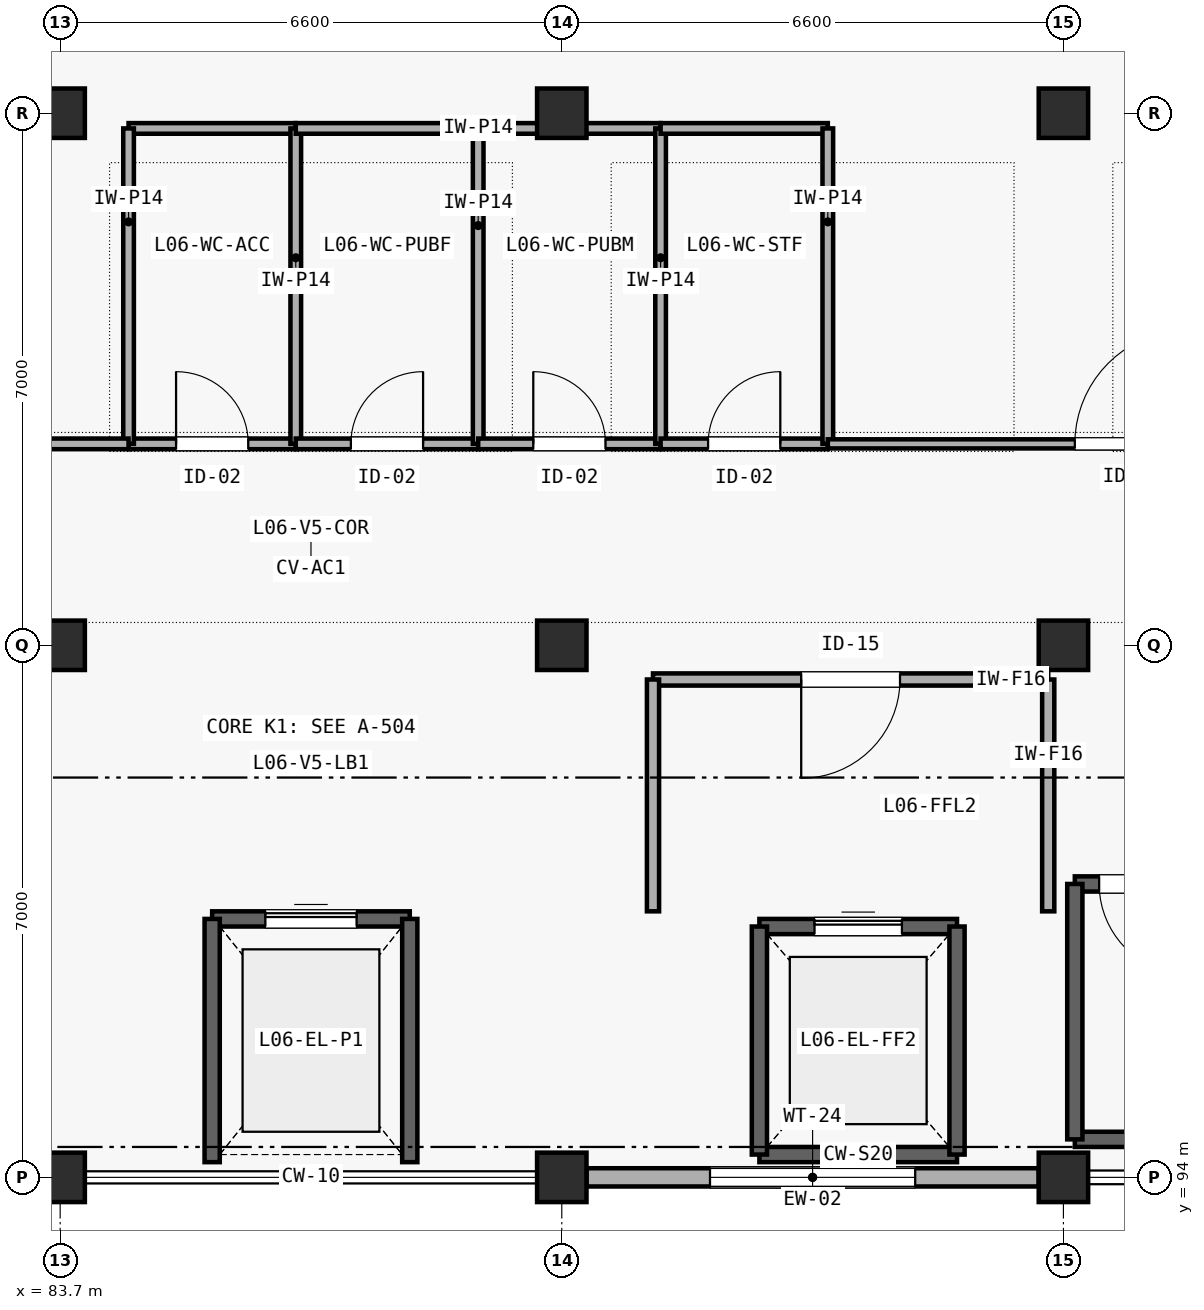
"""IFC4 building model, lengths in metres.
Left out: names, types, materials, properties, quantities, classifications, styles, units other than length and angle.
Written with IfcOpenShell. Run it as: python <this file> out.ifc"""

import sys

from ifc_helpers import new_model, si_unit, direction, frame, frame_2d, origin, origin_2d, place, context, subcontext, project, spatial, rectangle, extrude, element, fill, save


model = new_model("IFC4")
c1 = context("Model", 3, precision=1e-05, world=origin(), true_north=direction((0.0, 1.0)))
c2 = subcontext(c1, "Body", "Model", "MODEL_VIEW")
j1 = project(units=[si_unit("LENGTHUNIT", "METRE"), si_unit("PLANEANGLEUNIT", "RADIAN")], contexts=[c1])
p1 = place(None, origin())
s1 = spatial("IfcSite", under=j1, at=p1, CompositionType="ELEMENT")
p2 = place(p1, origin())
s2 = spatial("IfcBuilding", under=s1, at=p2, CompositionType="ELEMENT")
p3 = place(p2, frame((0.0, 0.0, 25.2)))
s3 = spatial("IfcBuildingStorey", under=s2, at=p3, CompositionType="ELEMENT", Elevation=25.2)
for number, where, z_axis, x_axis in (
    (1, (83.7, 94.0, 0.0), (0.0, 0.0, 1.0), (1.0, 0.0, 0.0)),
    (2, (83.7, 101.0, 0.0), (0.0, 0.0, 1.0), (1.0, 0.0, 0.0)),
    (3, (83.7, 108.0, 0.0), (0.0, 0.0, 1.0), (1.0, 0.0, 0.0)),
    (4, (90.3, 94.0, 0.0), (0.0, 0.0, 1.0), (1.0, 0.0, 0.0)),
    (5, (90.3, 101.0, 0.0), (0.0, 0.0, 1.0), (1.0, 0.0, 0.0)),
    (6, (90.3, 108.0, 0.0), (0.0, 0.0, 1.0), (1.0, 0.0, 0.0)),
    (7, (96.9, 94.0, 0.0), (0.0, 0.0, 1.0), (1.0, 0.0, 0.0)),
    (8, (96.9, 101.0, 0.0), (0.0, 0.0, 1.0), (1.0, 0.0, 0.0)),
    (9, (96.9, 108.0, 0.0), (0.0, 0.0, 1.0), (1.0, 0.0, 0.0)),
):
    element("IfcColumn", number, at=place(p3, frame(where, z_axis=z_axis, x_axis=x_axis)), inside=s3, PredefinedType="COLUMN", context=c2, shape_type="SweptSolid", body=[
        extrude(rectangle(XDim=0.65, YDim=0.65, at=origin_2d()), origin(), (0.0, 0.0, 1.0), 4.2),
    ])
p4 = place(p3, frame((90.625, 94.0, 0.0), z_axis=(0.0, 0.0, 1.0), x_axis=(1.0, 0.0, 0.0)))
e10 = element("IfcWall", 10, at=p4, inside=s3, PredefinedType="SOLIDWALL", context=c2, shape_type="SweptSolid", body=[
    extrude(rectangle(XDim=5.95, YDim=0.24, at=frame_2d((2.975, 0.0))), origin(), (0.0, 0.0, 1.0), 3.235),
])
p5 = place(p4, frame((1.625, 0.0, 0.85)))
e11 = element("IfcOpeningElement", 11, at=p5, cuts=e10, PredefinedType="OPENING", context=c2, shape_type="SweptSolid", body=[
    extrude(rectangle(XDim=2.7, YDim=1.6, at=frame_2d((1.35, 0.8))), frame((0.0, 0.13, 0.0), z_axis=(0.0, -1.0, 0.0), x_axis=(1.0, 0.0, 0.0)), (0.0, 0.0, 1.0), 0.26),
])
p6 = place(p3, frame((97.05, 94.5, 0.0), z_axis=(0.0, 0.0, 1.0), x_axis=(1.0, 0.0, 0.0)))
e12 = element("IfcWall", 12, at=p6, inside=s3, PredefinedType="SHEAR", context=c2, shape_type="SweptSolid", body=[
    extrude(rectangle(XDim=6.3, YDim=0.2, at=frame_2d((3.15, 0.0))), origin(), (0.0, 0.0, 1.0), 4.2),
])
p7 = place(p3, frame((97.05, 97.86, 0.0), z_axis=(0.0, 0.0, 1.0), x_axis=(1.0, 0.0, 0.0)))
e13 = element("IfcWall", 13, at=p7, inside=s3, PredefinedType="SHEAR", context=c2, shape_type="SweptSolid", body=[
    extrude(rectangle(XDim=6.3, YDim=0.2, at=frame_2d((3.15, 0.0))), origin(), (0.0, 0.0, 1.0), 4.2),
])
p8 = place(p7, frame((0.32, 0.0, 0.0)))
e14 = element("IfcOpeningElement", 14, at=p8, cuts=e13, PredefinedType="OPENING", context=c2, shape_type="SweptSolid", body=[
    extrude(rectangle(XDim=1.2, YDim=2.15, at=frame_2d((0.6, 1.075))), frame((0.0, 0.11, 0.0), z_axis=(0.0, -1.0, 0.0), x_axis=(1.0, 0.0, 0.0)), (0.0, 0.0, 1.0), 0.22),
])
p9 = place(p3, frame((97.05, 94.5, 0.0), z_axis=(0.0, 0.0, 1.0), x_axis=(0.0, 1.0, 0.0)))
e15 = element("IfcWall", 15, at=p9, inside=s3, PredefinedType="SHEAR", context=c2, shape_type="SweptSolid", body=[
    extrude(rectangle(XDim=3.36, YDim=0.2, at=frame_2d((1.68, 0.0))), origin(), (0.0, 0.0, 1.0), 4.2),
])
p10 = place(p3, frame((92.9, 94.3, 0.0), z_axis=(0.0, 0.0, 1.0), x_axis=(1.0, 0.0, 0.0)))
e16 = element("IfcWall", 16, at=p10, inside=s3, PredefinedType="SHEAR", context=c2, shape_type="SweptSolid", body=[
    extrude(rectangle(XDim=2.6, YDim=0.2, at=frame_2d((1.3, 0.0))), origin(), (0.0, 0.0, 1.0), 4.2),
])
p11 = place(p3, frame((92.9, 97.3, 0.0), z_axis=(0.0, 0.0, 1.0), x_axis=(1.0, 0.0, 0.0)))
e17 = element("IfcWall", 17, at=p11, inside=s3, PredefinedType="SHEAR", context=c2, shape_type="SweptSolid", body=[
    extrude(rectangle(XDim=2.6, YDim=0.2, at=frame_2d((1.3, 0.0))), origin(), (0.0, 0.0, 1.0), 4.2),
])
p12 = place(p11, frame((0.725, 0.0, 0.0)))
e18 = element("IfcOpeningElement", 18, at=p12, cuts=e17, PredefinedType="OPENING", context=c2, shape_type="SweptSolid", body=[
    extrude(rectangle(XDim=1.15, YDim=2.2, at=frame_2d((0.575, 1.1))), frame((0.0, 0.11, 0.0), z_axis=(0.0, -1.0, 0.0), x_axis=(1.0, 0.0, 0.0)), (0.0, 0.0, 1.0), 0.22),
])
for number, where, z_axis, x_axis in (
    (19, (92.9, 94.3, 0.0), (0.0, 0.0, 1.0), (0.0, 1.0, 0.0)),
    (20, (95.5, 94.3, 0.0), (0.0, 0.0, 1.0), (0.0, 1.0, 0.0)),
):
    element("IfcWall", number, at=place(p3, frame(where, z_axis=z_axis, x_axis=x_axis)), inside=s3, PredefinedType="SHEAR", context=c2, shape_type="SweptSolid", body=[
        extrude(rectangle(XDim=3.0, YDim=0.2, at=frame_2d((1.5, 0.0))), origin(), (0.0, 0.0, 1.0), 4.2),
    ])
p13 = place(p3, frame((85.7, 97.4, 0.0), z_axis=(0.0, 0.0, 1.0), x_axis=(1.0, 0.0, 0.0)))
e21 = element("IfcWall", 21, at=p13, inside=s3, PredefinedType="SHEAR", context=c2, shape_type="SweptSolid", body=[
    extrude(rectangle(XDim=2.6, YDim=0.2, at=frame_2d((1.3, 0.0))), origin(), (0.0, 0.0, 1.0), 4.2),
])
p14 = place(p13, frame((0.7, 0.0, 0.0)))
e22 = element("IfcOpeningElement", 22, at=p14, cuts=e21, PredefinedType="OPENING", context=c2, shape_type="SweptSolid", body=[
    extrude(rectangle(XDim=1.2, YDim=2.2, at=frame_2d((0.6, 1.1))), frame((0.0, 0.11, 0.0), z_axis=(0.0, -1.0, 0.0), x_axis=(1.0, 0.0, 0.0)), (0.0, 0.0, 1.0), 0.22),
])
for number, where, z_axis, x_axis in (
    (23, (85.7, 94.2, 0.0), (0.0, 0.0, 1.0), (0.0, 1.0, 0.0)),
    (24, (88.3, 94.2, 0.0), (0.0, 0.0, 1.0), (0.0, 1.0, 0.0)),
):
    element("IfcWall", number, at=place(p3, frame(where, z_axis=z_axis, x_axis=x_axis)), inside=s3, PredefinedType="SHEAR", context=c2, shape_type="SweptSolid", body=[
        extrude(rectangle(XDim=3.2, YDim=0.2, at=frame_2d((1.6, 0.0))), origin(), (0.0, 0.0, 1.0), 4.2),
    ])
p15 = place(p3, frame((91.5, 100.55, 0.0), z_axis=(0.0, 0.0, 1.0), x_axis=(1.0, 0.0, 0.0)))
e25 = element("IfcWall", 25, at=p15, inside=s3, PredefinedType="SOLIDWALL", context=c2, shape_type="SweptSolid", body=[
    extrude(rectangle(XDim=5.2, YDim=0.16, at=frame_2d((2.6, 0.0))), origin(), (0.0, 0.0, 1.0), 3.9),
])
p16 = place(p15, frame((1.95, 0.0, 0.0)))
e26 = element("IfcOpeningElement", 26, at=p16, cuts=e25, PredefinedType="OPENING", context=c2, shape_type="SweptSolid", body=[
    extrude(rectangle(XDim=1.3, YDim=2.15, at=frame_2d((0.65, 1.075))), frame((0.0, 0.09, 0.0), z_axis=(0.0, -1.0, 0.0), x_axis=(1.0, 0.0, 0.0)), (0.0, 0.0, 1.0), 0.18),
])
p17 = place(p3, frame((91.5, 97.5, 0.0), z_axis=(0.0, 0.0, 1.0), x_axis=(0.0, 1.0, 0.0)))
e27 = element("IfcWall", 27, at=p17, inside=s3, PredefinedType="SOLIDWALL", context=c2, shape_type="SweptSolid", body=[
    extrude(rectangle(XDim=3.05, YDim=0.16, at=frame_2d((1.525, 0.0))), origin(), (0.0, 0.0, 1.0), 3.9),
])
p18 = place(p3, frame((96.7, 97.5, 0.0), z_axis=(0.0, 0.0, 1.0), x_axis=(0.0, 1.0, 0.0)))
e28 = element("IfcWall", 28, at=p18, inside=s3, PredefinedType="SOLIDWALL", context=c2, shape_type="SweptSolid", body=[
    extrude(rectangle(XDim=3.05, YDim=0.16, at=frame_2d((1.525, 0.0))), origin(), (0.0, 0.0, 1.0), 3.405),
])
p19 = place(p3, frame((84.6, 103.65, 0.0), z_axis=(0.0, 0.0, 1.0), x_axis=(1.0, 0.0, 0.0)))
e29 = element("IfcWall", 29, at=p19, inside=s3, PredefinedType="PLUMBINGWALL", context=c2, shape_type="SweptSolid", body=[
    extrude(rectangle(XDim=2.2, YDim=0.14, at=frame_2d((1.1, 0.0))), origin(), (0.0, 0.0, 1.0), 3.9),
])
p20 = place(p19, frame((0.625, 0.0, 0.0)))
e30 = element("IfcOpeningElement", 30, at=p20, cuts=e29, PredefinedType="OPENING", context=c2, shape_type="SweptSolid", body=[
    extrude(rectangle(XDim=0.95, YDim=2.1, at=frame_2d((0.475, 1.05))), frame((0.0, 0.08, 0.0), z_axis=(0.0, -1.0, 0.0), x_axis=(1.0, 0.0, 0.0)), (0.0, 0.0, 1.0), 0.16),
])
p21 = place(p3, frame((84.6, 107.8, 0.0), z_axis=(0.0, 0.0, 1.0), x_axis=(1.0, 0.0, 0.0)))
e31 = element("IfcWall", 31, at=p21, inside=s3, PredefinedType="PLUMBINGWALL", context=c2, shape_type="SweptSolid", body=[
    extrude(rectangle(XDim=2.2, YDim=0.14, at=frame_2d((1.1, 0.0))), origin(), (0.0, 0.0, 1.0), 3.235),
])
for number, where, z_axis, x_axis in (
    (32, (84.6, 103.65, 0.0), (0.0, 0.0, 1.0), (0.0, 1.0, 0.0)),
    (33, (86.8, 103.65, 0.0), (0.0, 0.0, 1.0), (0.0, 1.0, 0.0)),
):
    element("IfcWall", number, at=place(p3, frame(where, z_axis=z_axis, x_axis=x_axis)), inside=s3, PredefinedType="PLUMBINGWALL", context=c2, shape_type="SweptSolid", body=[
        extrude(rectangle(XDim=4.15, YDim=0.14, at=frame_2d((2.075, 0.0))), origin(), (0.0, 0.0, 1.0), 3.9),
    ])
p22 = place(p3, frame((86.8, 103.65, 0.0), z_axis=(0.0, 0.0, 1.0), x_axis=(1.0, 0.0, 0.0)))
e34 = element("IfcWall", 34, at=p22, inside=s3, PredefinedType="PLUMBINGWALL", context=c2, shape_type="SweptSolid", body=[
    extrude(rectangle(XDim=2.4, YDim=0.14, at=frame_2d((1.2, 0.0))), origin(), (0.0, 0.0, 1.0), 3.9),
])
p23 = place(p22, frame((0.725, 0.0, 0.0)))
e35 = element("IfcOpeningElement", 35, at=p23, cuts=e34, PredefinedType="OPENING", context=c2, shape_type="SweptSolid", body=[
    extrude(rectangle(XDim=0.95, YDim=2.1, at=frame_2d((0.475, 1.05))), frame((0.0, 0.08, 0.0), z_axis=(0.0, -1.0, 0.0), x_axis=(1.0, 0.0, 0.0)), (0.0, 0.0, 1.0), 0.16),
])
p24 = place(p3, frame((86.8, 107.8, 0.0), z_axis=(0.0, 0.0, 1.0), x_axis=(1.0, 0.0, 0.0)))
e36 = element("IfcWall", 36, at=p24, inside=s3, PredefinedType="PLUMBINGWALL", context=c2, shape_type="SweptSolid", body=[
    extrude(rectangle(XDim=2.4, YDim=0.14, at=frame_2d((1.2, 0.0))), origin(), (0.0, 0.0, 1.0), 3.235),
])
p25 = place(p3, frame((89.2, 103.65, 0.0), z_axis=(0.0, 0.0, 1.0), x_axis=(0.0, 1.0, 0.0)))
e37 = element("IfcWall", 37, at=p25, inside=s3, PredefinedType="PLUMBINGWALL", context=c2, shape_type="SweptSolid", body=[
    extrude(rectangle(XDim=4.15, YDim=0.14, at=frame_2d((2.075, 0.0))), origin(), (0.0, 0.0, 1.0), 3.9),
])
p26 = place(p3, frame((89.2, 103.65, 0.0), z_axis=(0.0, 0.0, 1.0), x_axis=(1.0, 0.0, 0.0)))
e38 = element("IfcWall", 38, at=p26, inside=s3, PredefinedType="PLUMBINGWALL", context=c2, shape_type="SweptSolid", body=[
    extrude(rectangle(XDim=2.4, YDim=0.14, at=frame_2d((1.2, 0.0))), origin(), (0.0, 0.0, 1.0), 3.9),
])
p27 = place(p26, frame((0.725, 0.0, 0.0)))
e39 = element("IfcOpeningElement", 39, at=p27, cuts=e38, PredefinedType="OPENING", context=c2, shape_type="SweptSolid", body=[
    extrude(rectangle(XDim=0.95, YDim=2.1, at=frame_2d((0.475, 1.05))), frame((0.0, 0.08, 0.0), z_axis=(0.0, -1.0, 0.0), x_axis=(1.0, 0.0, 0.0)), (0.0, 0.0, 1.0), 0.16),
])
p28 = place(p3, frame((89.2, 107.8, 0.0), z_axis=(0.0, 0.0, 1.0), x_axis=(1.0, 0.0, 0.0)))
e40 = element("IfcWall", 40, at=p28, inside=s3, PredefinedType="PLUMBINGWALL", context=c2, shape_type="SweptSolid", body=[
    extrude(rectangle(XDim=2.4, YDim=0.14, at=frame_2d((1.2, 0.0))), origin(), (0.0, 0.0, 1.0), 3.235),
])
p29 = place(p3, frame((91.6, 103.65, 0.0), z_axis=(0.0, 0.0, 1.0), x_axis=(0.0, 1.0, 0.0)))
e41 = element("IfcWall", 41, at=p29, inside=s3, PredefinedType="PLUMBINGWALL", context=c2, shape_type="SweptSolid", body=[
    extrude(rectangle(XDim=4.15, YDim=0.14, at=frame_2d((2.075, 0.0))), origin(), (0.0, 0.0, 1.0), 3.9),
])
p30 = place(p3, frame((91.6, 103.65, 0.0), z_axis=(0.0, 0.0, 1.0), x_axis=(1.0, 0.0, 0.0)))
e42 = element("IfcWall", 42, at=p30, inside=s3, PredefinedType="PLUMBINGWALL", context=c2, shape_type="SweptSolid", body=[
    extrude(rectangle(XDim=2.2, YDim=0.14, at=frame_2d((1.1, 0.0))), origin(), (0.0, 0.0, 1.0), 3.9),
])
p31 = place(p30, frame((0.625, 0.0, 0.0)))
e43 = element("IfcOpeningElement", 43, at=p31, cuts=e42, PredefinedType="OPENING", context=c2, shape_type="SweptSolid", body=[
    extrude(rectangle(XDim=0.95, YDim=2.1, at=frame_2d((0.475, 1.05))), frame((0.0, 0.08, 0.0), z_axis=(0.0, -1.0, 0.0), x_axis=(1.0, 0.0, 0.0)), (0.0, 0.0, 1.0), 0.16),
])
p32 = place(p3, frame((91.6, 107.8, 0.0), z_axis=(0.0, 0.0, 1.0), x_axis=(1.0, 0.0, 0.0)))
e44 = element("IfcWall", 44, at=p32, inside=s3, PredefinedType="PLUMBINGWALL", context=c2, shape_type="SweptSolid", body=[
    extrude(rectangle(XDim=2.2, YDim=0.14, at=frame_2d((1.1, 0.0))), origin(), (0.0, 0.0, 1.0), 3.235),
])
p33 = place(p3, frame((93.8, 103.65, 0.0), z_axis=(0.0, 0.0, 1.0), x_axis=(0.0, 1.0, 0.0)))
e45 = element("IfcWall", 45, at=p33, inside=s3, PredefinedType="PLUMBINGWALL", context=c2, shape_type="SweptSolid", body=[
    extrude(rectangle(XDim=4.15, YDim=0.14, at=frame_2d((2.075, 0.0))), origin(), (0.0, 0.0, 1.0), 3.9),
])
p34 = place(p3, frame((78.2, 103.65, 0.0), z_axis=(0.0, 0.0, 1.0), x_axis=(1.0, 0.0, 0.0)))
e46 = element("IfcWall", 46, at=p34, inside=s3, PredefinedType="PLUMBINGWALL", context=c2, shape_type="SweptSolid", body=[
    extrude(rectangle(XDim=6.4, YDim=0.14, at=frame_2d((3.2, 0.0))), origin(), (0.0, 0.0, 1.0), 3.9),
])
p35 = place(p34, frame((2.225, 0.0, 0.0)))
e47 = element("IfcOpeningElement", 47, at=p35, cuts=e46, PredefinedType="OPENING", context=c2, shape_type="SweptSolid", body=[
    extrude(rectangle(XDim=1.95, YDim=2.3, at=frame_2d((0.975, 1.15))), frame((0.0, 0.08, 0.0), z_axis=(0.0, -1.0, 0.0), x_axis=(1.0, 0.0, 0.0)), (0.0, 0.0, 1.0), 0.16),
])
p36 = place(p3, frame((93.8, 103.65, 0.0), z_axis=(0.0, 0.0, 1.0), x_axis=(1.0, 0.0, 0.0)))
e48 = element("IfcWall", 48, at=p36, inside=s3, PredefinedType="PARTITIONING", context=c2, shape_type="SweptSolid", body=[
    extrude(rectangle(XDim=8.0, YDim=0.12, at=frame_2d((4.0, 0.0))), origin(), (0.0, 0.0, 1.0), 3.9),
])
p37 = place(p36, frame((3.25, 0.0, 0.0)))
e49 = element("IfcOpeningElement", 49, at=p37, cuts=e48, PredefinedType="OPENING", context=c2, shape_type="SweptSolid", body=[
    extrude(rectangle(XDim=1.5, YDim=2.15, at=frame_2d((0.75, 1.075))), frame((0.0, 0.07, 0.0), z_axis=(0.0, -1.0, 0.0), x_axis=(1.0, 0.0, 0.0)), (0.0, 0.0, 1.0), 0.14),
])
p38 = place(p5, origin())
e50 = element("IfcWindow", 50, at=p38, inside=s3, PartitioningType="SINGLE_PANEL", PredefinedType="WINDOW", context=c2, shape_type="SweptSolid", body=[
    extrude(rectangle(XDim=2.7, YDim=1.6, at=frame_2d((1.35, 0.8))), frame((0.0, 0.03, 0.0), z_axis=(0.0, -1.0, 0.0), x_axis=(1.0, 0.0, 0.0)), (0.0, 0.0, 1.0), 0.06),
])
fill(e11, e50)
p39 = place(p8, frame((1.2, 0.0, 0.0), z_axis=(0.0, 0.0, 1.0), x_axis=(-1.0, 0.0, 0.0)))
e51 = element("IfcDoor", 51, at=p39, inside=s3, OperationType="SINGLE_SWING_LEFT", PredefinedType="DOOR", context=c2, shape_type="SweptSolid", body=[
    extrude(rectangle(XDim=1.2, YDim=2.15, at=frame_2d((0.6, 1.075))), frame((0.0, 0.025, 0.0), z_axis=(0.0, -1.0, 0.0), x_axis=(1.0, 0.0, 0.0)), (0.0, 0.0, 1.0), 0.05),
])
fill(e14, e51)
p40 = place(p12, origin())
e52 = element("IfcDoor", 52, at=p40, inside=s3, OperationType="SLIDING_TO_LEFT", PredefinedType="DOOR", context=c2, shape_type="SweptSolid", body=[
    extrude(rectangle(XDim=1.15, YDim=2.2, at=frame_2d((0.575, 1.1))), frame((0.0, 0.025, 0.0), z_axis=(0.0, -1.0, 0.0), x_axis=(1.0, 0.0, 0.0)), (0.0, 0.0, 1.0), 0.05),
])
fill(e18, e52)
p41 = place(p14, origin())
e53 = element("IfcDoor", 53, at=p41, inside=s3, OperationType="SLIDING_TO_LEFT", PredefinedType="DOOR", context=c2, shape_type="SweptSolid", body=[
    extrude(rectangle(XDim=1.2, YDim=2.2, at=frame_2d((0.6, 1.1))), frame((0.0, 0.025, 0.0), z_axis=(0.0, -1.0, 0.0), x_axis=(1.0, 0.0, 0.0)), (0.0, 0.0, 1.0), 0.05),
])
fill(e22, e53)
p42 = place(p16, frame((1.3, 0.0, 0.0), z_axis=(0.0, 0.0, 1.0), x_axis=(-1.0, 0.0, 0.0)))
e54 = element("IfcDoor", 54, at=p42, inside=s3, OperationType="SINGLE_SWING_RIGHT", PredefinedType="DOOR", context=c2, shape_type="SweptSolid", body=[
    extrude(rectangle(XDim=1.3, YDim=2.15, at=frame_2d((0.65, 1.075))), frame((0.0, 0.025, 0.0), z_axis=(0.0, -1.0, 0.0), x_axis=(1.0, 0.0, 0.0)), (0.0, 0.0, 1.0), 0.05),
])
fill(e26, e54)
p43 = place(p20, origin())
e55 = element("IfcDoor", 55, at=p43, inside=s3, OperationType="SINGLE_SWING_LEFT", PredefinedType="DOOR", context=c2, shape_type="SweptSolid", body=[
    extrude(rectangle(XDim=0.95, YDim=2.1, at=frame_2d((0.475, 1.05))), frame((0.0, 0.025, 0.0), z_axis=(0.0, -1.0, 0.0), x_axis=(1.0, 0.0, 0.0)), (0.0, 0.0, 1.0), 0.05),
])
fill(e30, e55)
p44 = place(p23, origin())
e56 = element("IfcDoor", 56, at=p44, inside=s3, OperationType="SINGLE_SWING_RIGHT", PredefinedType="DOOR", context=c2, shape_type="SweptSolid", body=[
    extrude(rectangle(XDim=0.95, YDim=2.1, at=frame_2d((0.475, 1.05))), frame((0.0, 0.025, 0.0), z_axis=(0.0, -1.0, 0.0), x_axis=(1.0, 0.0, 0.0)), (0.0, 0.0, 1.0), 0.05),
])
fill(e35, e56)
p45 = place(p27, origin())
e57 = element("IfcDoor", 57, at=p45, inside=s3, OperationType="SINGLE_SWING_LEFT", PredefinedType="DOOR", context=c2, shape_type="SweptSolid", body=[
    extrude(rectangle(XDim=0.95, YDim=2.1, at=frame_2d((0.475, 1.05))), frame((0.0, 0.025, 0.0), z_axis=(0.0, -1.0, 0.0), x_axis=(1.0, 0.0, 0.0)), (0.0, 0.0, 1.0), 0.05),
])
fill(e39, e57)
p46 = place(p31, origin())
e58 = element("IfcDoor", 58, at=p46, inside=s3, OperationType="SINGLE_SWING_RIGHT", PredefinedType="DOOR", context=c2, shape_type="SweptSolid", body=[
    extrude(rectangle(XDim=0.95, YDim=2.1, at=frame_2d((0.475, 1.05))), frame((0.0, 0.025, 0.0), z_axis=(0.0, -1.0, 0.0), x_axis=(1.0, 0.0, 0.0)), (0.0, 0.0, 1.0), 0.05),
])
fill(e43, e58)
p47 = place(p37, origin())
e59 = element("IfcDoor", 59, at=p47, inside=s3, OperationType="SINGLE_SWING_RIGHT", PredefinedType="DOOR", context=c2, shape_type="SweptSolid", body=[
    extrude(rectangle(XDim=1.5, YDim=2.15, at=frame_2d((0.75, 1.075))), frame((0.0, 0.025, 0.0), z_axis=(0.0, -1.0, 0.0), x_axis=(1.0, 0.0, 0.0)), (0.0, 0.0, 1.0), 0.05),
])
fill(e49, e59)
save(model, sys.argv[1])
